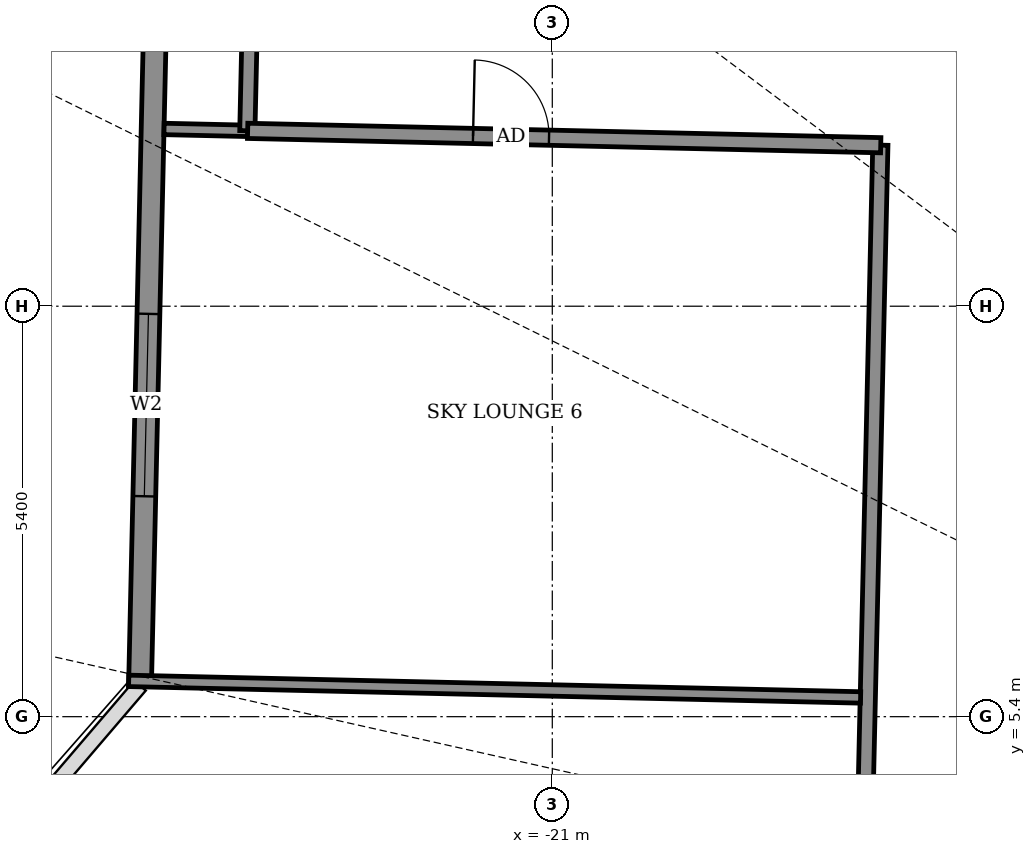
"""IFC4 building model, lengths in metres.
Left out: names, types, materials, properties, quantities, classifications, styles, units other than length and angle.
Written with IfcOpenShell. Run it as: python <this file> out.ifc"""

import sys

from ifc_helpers import new_model, si_unit, direction, frame, frame_2d, origin, place, context, subcontext, project, spatial, rectangle, extrude, element, fill, save


model = new_model("IFC4")
c1 = context("Model", 3, precision=1e-05, world=origin(), true_north=direction((0.0, 1.0)))
c2 = subcontext(c1, "Body", "Model", "MODEL_VIEW")
j1 = project(units=[si_unit("LENGTHUNIT", "METRE"), si_unit("PLANEANGLEUNIT", "RADIAN")], contexts=[c1])
p1 = place(None, origin())
s1 = spatial("IfcSite", under=j1, at=p1, CompositionType="ELEMENT")
p2 = place(p1, origin())
s2 = spatial("IfcBuilding", under=s1, at=p2, CompositionType="ELEMENT")
p3 = place(p2, frame((0.0, 0.0, 252.7)))
s3 = spatial("IfcBuildingStorey", under=s2, at=p3, CompositionType="ELEMENT", Elevation=252.7)
p4 = place(p3, frame((-26.113, 19.534, 0.0), z_axis=(0.0, 0.0, 1.0), x_axis=(-0.022654755793, -0.999743348085, 0.0)))
e1 = element("IfcWall", 1, at=p4, inside=s3, PredefinedType="SOLIDWALL", context=c2, shape_type="SweptSolid", body=[
    extrude(rectangle(XDim=13.729, YDim=0.3, at=frame_2d((6.865, 0.0))), origin(), (0.0, 0.0, 1.0), 2.45),
])
p5 = place(p4, frame((2.375, 0.0, 0.0)))
e2 = element("IfcOpeningElement", 2, at=p5, cuts=e1, PredefinedType="OPENING", context=c2, shape_type="SweptSolid", body=[
    extrude(rectangle(XDim=1.5, YDim=2.4, at=frame_2d((0.75, 1.2))), frame((0.0, 0.16, 0.0), z_axis=(0.0, -1.0, 0.0), x_axis=(1.0, 0.0, 0.0)), (0.0, 0.0, 1.0), 0.32),
])
p6 = place(p4, frame((8.837, 0.0, 0.9)))
e3 = element("IfcOpeningElement", 3, at=p6, cuts=e1, PredefinedType="OPENING", context=c2, shape_type="SweptSolid", body=[
    extrude(rectangle(XDim=2.4, YDim=1.5, at=frame_2d((1.2, 0.75))), frame((0.0, 0.16, 0.0), z_axis=(0.0, -1.0, 0.0), x_axis=(1.0, 0.0, 0.0)), (0.0, 0.0, 1.0), 0.32),
])
p7 = place(p3, frame((-17.262, -12.525, 0.0), z_axis=(0.0, 0.0, 1.0), x_axis=(0.022706151961, 0.999742182097, 0.0)))
e4 = element("IfcWall", 4, at=p7, inside=s3, PredefinedType="PARTITIONING", context=c2, shape_type="SweptSolid", body=[
    extrude(rectangle(XDim=25.45, YDim=0.2, at=frame_2d((12.725, 0.0))), origin(), (0.0, 0.0, 1.0), 2.45),
])
p8 = place(p7, frame((15.314, 0.0, 0.0)))
e5 = element("IfcOpeningElement", 5, at=p8, cuts=e4, PredefinedType="OPENING", context=c2, shape_type="SweptSolid", body=[
    extrude(rectangle(XDim=1.0, YDim=2.1, at=frame_2d((0.5, 1.05))), frame((0.0, 0.11, 0.0), z_axis=(0.0, -1.0, 0.0), x_axis=(1.0, 0.0, 0.0)), (0.0, 0.0, 1.0), 0.22),
])
p9 = place(p7, frame((10.143, 0.0, 0.0)))
e6 = element("IfcOpeningElement", 6, at=p9, cuts=e4, PredefinedType="OPENING", context=c2, shape_type="SweptSolid", body=[
    extrude(rectangle(XDim=1.0, YDim=2.1, at=frame_2d((0.5, 1.05))), frame((0.0, 0.11, 0.0), z_axis=(0.0, -1.0, 0.0), x_axis=(1.0, 0.0, 0.0)), (0.0, 0.0, 1.0), 0.22),
])
p10 = place(p7, frame((5.578, 0.0, 0.0)))
e7 = element("IfcOpeningElement", 7, at=p10, cuts=e4, PredefinedType="OPENING", context=c2, shape_type="SweptSolid", body=[
    extrude(rectangle(XDim=1.0, YDim=2.1, at=frame_2d((0.5, 1.05))), frame((0.0, 0.11, 0.0), z_axis=(0.0, -1.0, 0.0), x_axis=(1.0, 0.0, 0.0)), (0.0, 0.0, 1.0), 0.22),
])
p11 = place(p7, frame((0.562, 0.0, 0.0)))
e8 = element("IfcOpeningElement", 8, at=p11, cuts=e4, PredefinedType="OPENING", context=c2, shape_type="SweptSolid", body=[
    extrude(rectangle(XDim=0.9, YDim=2.1, at=frame_2d((0.45, 1.05))), frame((0.0, 0.11, 0.0), z_axis=(0.0, -1.0, 0.0), x_axis=(1.0, 0.0, 0.0)), (0.0, 0.0, 1.0), 0.22),
])
p12 = place(p3, frame((-26.573, 5.871, 0.0), z_axis=(0.0, 0.0, 1.0), x_axis=(0.999743768709, -0.022636186244, 0.0)))
e9 = element("IfcWall", 9, at=p12, inside=s3, PredefinedType="PARTITIONING", context=c2, shape_type="SweptSolid", body=[
    extrude(rectangle(XDim=9.631, YDim=0.15, at=frame_2d((4.816, 0.0))), origin(), (0.0, 0.0, 1.0), 2.65),
])
p13 = place(p3, frame((-26.108, 13.132, 0.0), z_axis=(0.0, 0.0, 1.0), x_axis=(0.999740692912, -0.02277162569, 0.0)))
e10 = element("IfcWall", 10, at=p13, inside=s3, PredefinedType="PARTITIONING", context=c2, shape_type="SweptSolid", body=[
    extrude(rectangle(XDim=1.104, YDim=0.15, at=frame_2d((0.552, 0.0))), origin(), (0.0, 0.0, 1.0), 2.55),
])
p14 = place(p3, frame((-25.012, 13.108, 0.0), z_axis=(0.0, 0.0, 1.0), x_axis=(0.022632637625, 0.99974384905, 0.0)))
e11 = element("IfcWall", 11, at=p14, inside=s3, PredefinedType="PARTITIONING", context=c2, shape_type="SweptSolid", body=[
    extrude(rectangle(XDim=1.5, YDim=0.2, at=frame_2d((0.75, 0.0))), origin(), (0.0, 0.0, 1.0), 2.55),
])
p15 = place(p3, frame((-25.008, 13.107, 0.0), z_axis=(0.0, 0.0, 1.0), x_axis=(0.999742742467, -0.022681465666, 0.0)))
e12 = element("IfcWall", 12, at=p15, inside=s3, PredefinedType="PARTITIONING", context=c2, shape_type="SweptSolid", body=[
    extrude(rectangle(XDim=8.331, YDim=0.2, at=frame_2d((4.166, 0.0))), origin(), (0.0, 0.0, 1.0), 2.55),
])
p16 = place(p15, frame((2.966, 0.0, 0.0)))
e13 = element("IfcOpeningElement", 13, at=p16, cuts=e12, PredefinedType="OPENING", context=c2, shape_type="SweptSolid", body=[
    extrude(rectangle(XDim=1.0, YDim=2.1, at=frame_2d((0.5, 1.05))), frame((0.0, 0.11, 0.0), z_axis=(0.0, -1.0, 0.0), x_axis=(1.0, 0.0, 0.0)), (0.0, 0.0, 1.0), 0.22),
])
p17 = place(p3, frame((-24.974, 14.607, 0.0), z_axis=(0.0, 0.0, 1.0), x_axis=(0.999742823946, -0.02267787398, 0.0)))
e14 = element("IfcWall", 14, at=p17, inside=s3, PredefinedType="PARTITIONING", context=c2, shape_type="SweptSolid", body=[
    extrude(rectangle(XDim=48.284, YDim=0.2, at=frame_2d((24.142, 0.0))), origin(), (0.0, 0.0, 1.0), 2.45),
])
p18 = place(p17, frame((46.283, 0.0, 0.0)))
e15 = element("IfcOpeningElement", 15, at=p18, cuts=e14, PredefinedType="OPENING", context=c2, shape_type="SweptSolid", body=[
    extrude(rectangle(XDim=1.0, YDim=2.1, at=frame_2d((0.5, 1.05))), frame((0.0, 0.11, 0.0), z_axis=(0.0, -1.0, 0.0), x_axis=(1.0, 0.0, 0.0)), (0.0, 0.0, 1.0), 0.22),
])
p19 = place(p17, frame((43.75, 0.0, 0.0)))
e16 = element("IfcOpeningElement", 16, at=p19, cuts=e14, PredefinedType="OPENING", context=c2, shape_type="SweptSolid", body=[
    extrude(rectangle(XDim=0.9, YDim=2.1, at=frame_2d((0.45, 1.05))), frame((0.0, 0.11, 0.0), z_axis=(0.0, -1.0, 0.0), x_axis=(1.0, 0.0, 0.0)), (0.0, 0.0, 1.0), 0.22),
])
p20 = place(p17, frame((39.4, 0.0, 0.0)))
e17 = element("IfcOpeningElement", 17, at=p20, cuts=e14, PredefinedType="OPENING", context=c2, shape_type="SweptSolid", body=[
    extrude(rectangle(XDim=1.0, YDim=2.1, at=frame_2d((0.5, 1.05))), frame((0.0, 0.11, 0.0), z_axis=(0.0, -1.0, 0.0), x_axis=(1.0, 0.0, 0.0)), (0.0, 0.0, 1.0), 0.22),
])
p21 = place(p17, frame((35.25, 0.0, 0.0)))
e18 = element("IfcOpeningElement", 18, at=p21, cuts=e14, PredefinedType="OPENING", context=c2, shape_type="SweptSolid", body=[
    extrude(rectangle(XDim=0.9, YDim=2.1, at=frame_2d((0.45, 1.05))), frame((0.0, 0.11, 0.0), z_axis=(0.0, -1.0, 0.0), x_axis=(1.0, 0.0, 0.0)), (0.0, 0.0, 1.0), 0.22),
])
p22 = place(p17, frame((28.625, 0.0, 0.0)))
e19 = element("IfcOpeningElement", 19, at=p22, cuts=e14, PredefinedType="OPENING", context=c2, shape_type="SweptSolid", body=[
    extrude(rectangle(XDim=1.0, YDim=2.1, at=frame_2d((0.5, 1.05))), frame((0.0, 0.11, 0.0), z_axis=(0.0, -1.0, 0.0), x_axis=(1.0, 0.0, 0.0)), (0.0, 0.0, 1.0), 0.22),
])
p23 = place(p17, frame((32.85, 0.0, 0.0)))
e20 = element("IfcOpeningElement", 20, at=p23, cuts=e14, PredefinedType="OPENING", context=c2, shape_type="SweptSolid", body=[
    extrude(rectangle(XDim=0.9, YDim=2.1, at=frame_2d((0.45, 1.05))), frame((0.0, 0.11, 0.0), z_axis=(0.0, -1.0, 0.0), x_axis=(1.0, 0.0, 0.0)), (0.0, 0.0, 1.0), 0.22),
])
p24 = place(p17, frame((24.4, 0.0, 0.0)))
e21 = element("IfcOpeningElement", 21, at=p24, cuts=e14, PredefinedType="OPENING", context=c2, shape_type="SweptSolid", body=[
    extrude(rectangle(XDim=0.9, YDim=2.1, at=frame_2d((0.45, 1.05))), frame((0.0, 0.11, 0.0), z_axis=(0.0, -1.0, 0.0), x_axis=(1.0, 0.0, 0.0)), (0.0, 0.0, 1.0), 0.22),
])
p25 = place(p17, frame((17.225, 0.0, 0.0)))
e22 = element("IfcOpeningElement", 22, at=p25, cuts=e14, PredefinedType="OPENING", context=c2, shape_type="SweptSolid", body=[
    extrude(rectangle(XDim=1.0, YDim=2.1, at=frame_2d((0.5, 1.05))), frame((0.0, 0.11, 0.0), z_axis=(0.0, -1.0, 0.0), x_axis=(1.0, 0.0, 0.0)), (0.0, 0.0, 1.0), 0.22),
])
p26 = place(p17, frame((19.5, 0.0, 0.0)))
e23 = element("IfcOpeningElement", 23, at=p26, cuts=e14, PredefinedType="OPENING", context=c2, shape_type="SweptSolid", body=[
    extrude(rectangle(XDim=0.9, YDim=2.1, at=frame_2d((0.45, 1.05))), frame((0.0, 0.11, 0.0), z_axis=(0.0, -1.0, 0.0), x_axis=(1.0, 0.0, 0.0)), (0.0, 0.0, 1.0), 0.22),
])
p27 = place(p17, frame((14.4, 0.0, 0.0)))
e24 = element("IfcOpeningElement", 24, at=p27, cuts=e14, PredefinedType="OPENING", context=c2, shape_type="SweptSolid", body=[
    extrude(rectangle(XDim=1.0, YDim=2.1, at=frame_2d((0.5, 1.05))), frame((0.0, 0.11, 0.0), z_axis=(0.0, -1.0, 0.0), x_axis=(1.0, 0.0, 0.0)), (0.0, 0.0, 1.0), 0.22),
])
p28 = place(p17, frame((11.45, 0.0, 0.0)))
e25 = element("IfcOpeningElement", 25, at=p28, cuts=e14, PredefinedType="OPENING", context=c2, shape_type="SweptSolid", body=[
    extrude(rectangle(XDim=0.9, YDim=2.1, at=frame_2d((0.45, 1.05))), frame((0.0, 0.11, 0.0), z_axis=(0.0, -1.0, 0.0), x_axis=(1.0, 0.0, 0.0)), (0.0, 0.0, 1.0), 0.22),
])
p29 = place(p17, frame((2.95, 0.0, 0.0)))
e26 = element("IfcOpeningElement", 26, at=p29, cuts=e14, PredefinedType="OPENING", context=c2, shape_type="SweptSolid", body=[
    extrude(rectangle(XDim=1.0, YDim=2.1, at=frame_2d((0.5, 1.05))), frame((0.0, 0.11, 0.0), z_axis=(0.0, -1.0, 0.0), x_axis=(1.0, 0.0, 0.0)), (0.0, 0.0, 1.0), 0.22),
])
p30 = place(p17, frame((9.05, 0.0, 0.0)))
e27 = element("IfcOpeningElement", 27, at=p30, cuts=e14, PredefinedType="OPENING", context=c2, shape_type="SweptSolid", body=[
    extrude(rectangle(XDim=0.9, YDim=2.1, at=frame_2d((0.45, 1.05))), frame((0.0, 0.11, 0.0), z_axis=(0.0, -1.0, 0.0), x_axis=(1.0, 0.0, 0.0)), (0.0, 0.0, 1.0), 0.22),
])
p31 = place(p6, origin())
e28 = element("IfcWindow", 28, at=p31, inside=s3, PartitioningType="DOUBLE_PANEL_VERTICAL", PredefinedType="WINDOW", context=c2, shape_type="SweptSolid", body=[
    extrude(rectangle(XDim=2.4, YDim=1.5, at=frame_2d((1.2, 0.75))), frame((0.0, 0.03, 0.0), z_axis=(0.0, -1.0, 0.0), x_axis=(1.0, 0.0, 0.0)), (0.0, 0.0, 1.0), 0.06),
])
fill(e3, e28)
p32 = place(p16, origin())
e29 = element("IfcDoor", 29, at=p32, inside=s3, OperationType="SINGLE_SWING_LEFT", PredefinedType="DOOR", context=c2, shape_type="SweptSolid", body=[
    extrude(rectangle(XDim=1.0, YDim=2.1, at=frame_2d((0.5, 1.05))), frame((0.0, 0.025, 0.0), z_axis=(0.0, -1.0, 0.0), x_axis=(1.0, 0.0, 0.0)), (0.0, 0.0, 1.0), 0.05),
])
fill(e13, e29)
save(model, sys.argv[1])
